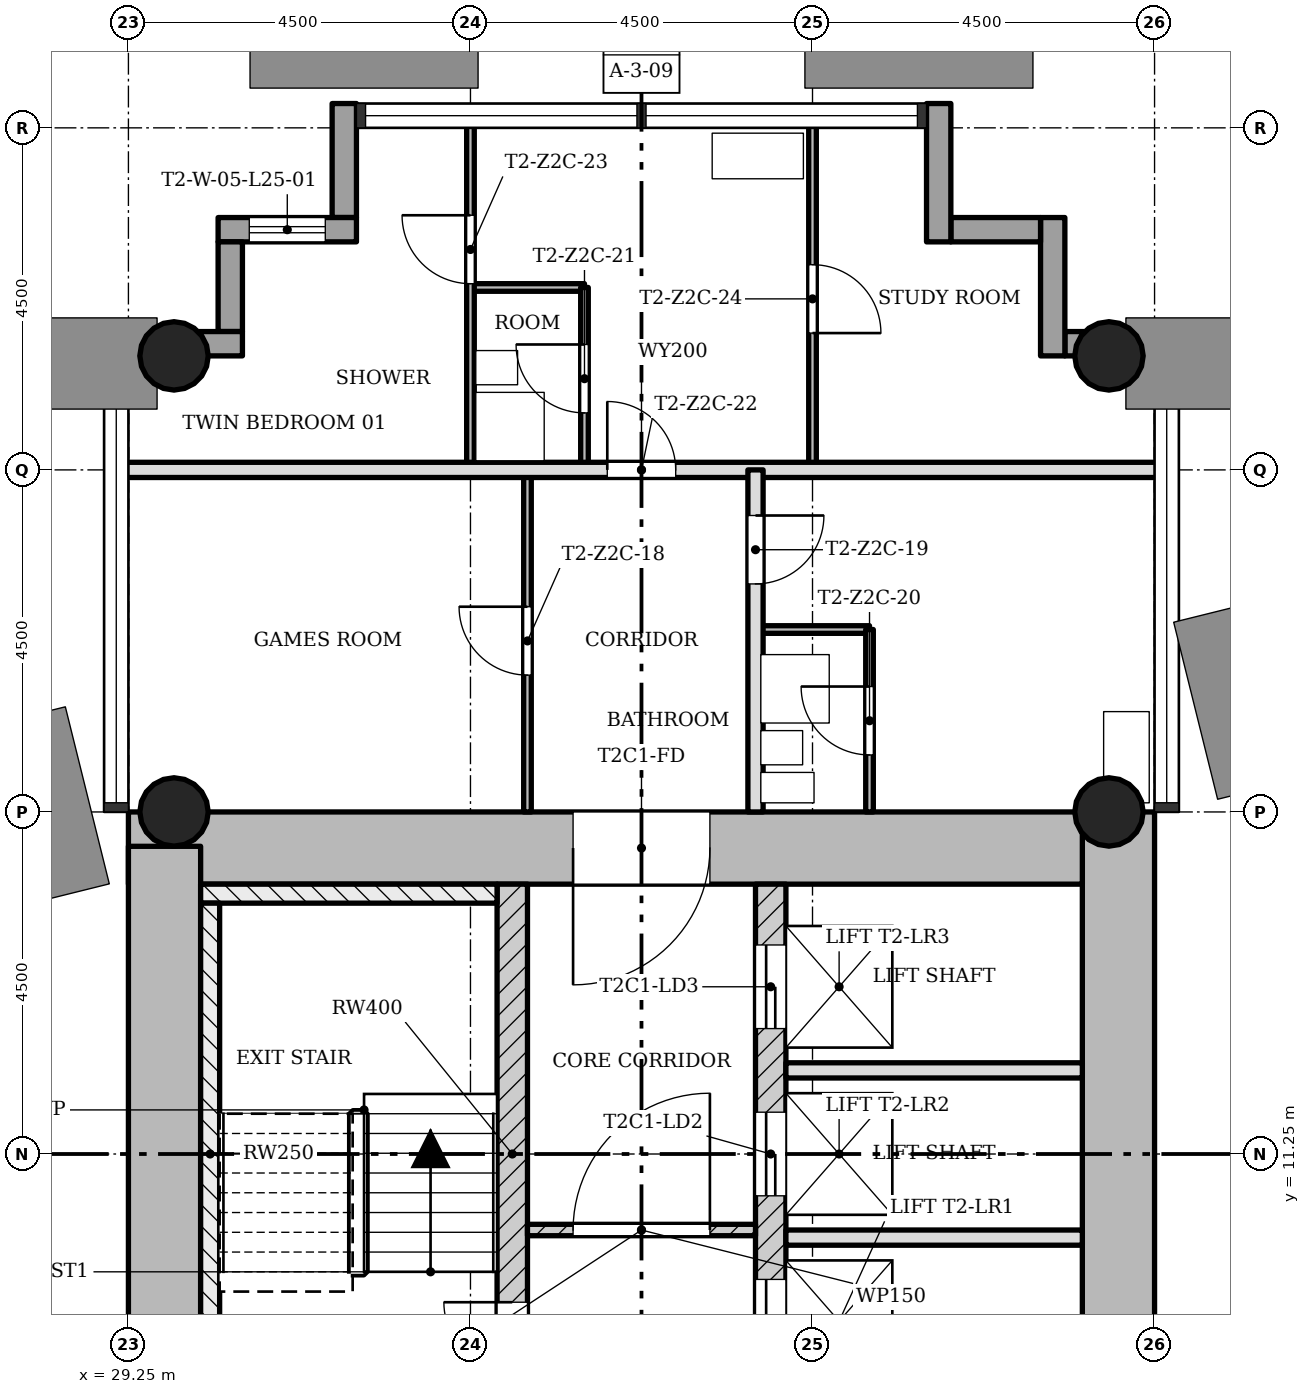
"""IFC4 building model, lengths in metres.
Left out: names, types, materials, properties, quantities, classifications, styles, units other than length and angle.
Written with IfcOpenShell. Run it as: python <this file> out.ifc"""

import sys

from ifc_helpers import new_model, si_unit, direction, frame, frame_2d, origin, origin_2d, place, context, subcontext, project, spatial, rectangle, hollow_circle, extrude, element, fill, save


model = new_model("IFC4")
c1 = context("Model", 3, precision=1e-05, world=origin(), true_north=direction((0.0, 1.0)))
c2 = subcontext(c1, "Body", "Model", "MODEL_VIEW")
j1 = project(units=[si_unit("LENGTHUNIT", "METRE"), si_unit("PLANEANGLEUNIT", "RADIAN")], contexts=[c1])
p1 = place(None, origin())
s1 = spatial("IfcSite", under=j1, at=p1, CompositionType="ELEMENT")
p2 = place(p1, origin())
s2 = spatial("IfcBuilding", under=s1, at=p2, CompositionType="ELEMENT")
p3 = place(p2, frame((0.0, 0.0, 93.6)))
s3 = spatial("IfcBuildingStorey", under=s2, at=p3, CompositionType="ELEMENT", Elevation=93.6)
p4 = place(p3, frame((42.275, 7.7, 0.0), z_axis=(0.0, 0.0, 1.0), x_axis=(0.0, 1.0, 0.0)))
e1 = element("IfcWall", 1, at=p4, inside=s3, PredefinedType="SHEAR", context=c2, shape_type="SweptSolid", body=[
    extrude(rectangle(XDim=8.05, YDim=0.95, at=frame_2d((4.025, 0.0))), origin(), (0.0, 0.0, 1.0), 3.4),
])
p5 = place(p3, frame((41.8, 15.275, 0.0), z_axis=(0.0, 0.0, 1.0), x_axis=(-1.0, 0.0, 0.0)))
e2 = element("IfcWall", 2, at=p5, inside=s3, PredefinedType="SHEAR", context=c2, shape_type="SweptSolid", body=[
    extrude(rectangle(XDim=12.55, YDim=0.95, at=frame_2d((6.275, 0.0))), origin(), (0.0, 0.0, 1.0), 3.4),
])
p6 = place(p5, frame((4.9, 0.0, 0.0)))
e3 = element("IfcOpeningElement", 3, at=p6, cuts=e2, PredefinedType="OPENING", context=c2, shape_type="SweptSolid", body=[
    extrude(rectangle(XDim=1.8, YDim=2.1, at=frame_2d((0.9, 1.05))), frame((0.0, 0.485, 0.0), z_axis=(0.0, -1.0, 0.0), x_axis=(1.0, 0.0, 0.0)), (0.0, 0.0, 1.0), 0.97),
])
p7 = place(p3, frame((29.725, 15.298, 0.0), z_axis=(0.0, 0.0, 1.0), x_axis=(0.0, -1.0, 0.0)))
e4 = element("IfcWall", 4, at=p7, inside=s3, PredefinedType="SHEAR", context=c2, shape_type="SweptSolid", body=[
    extrude(rectangle(XDim=8.696, YDim=0.95, at=frame_2d((4.348, 0.0))), origin(), (0.0, 0.0, 1.0), 3.4),
])
p8 = place(p3, frame((34.3, 7.7, 0.0), z_axis=(0.0, 0.0, 1.0), x_axis=(0.0, 1.0, 0.0)))
e5 = element("IfcWall", 5, at=p8, inside=s3, PredefinedType="SHEAR", context=c2, shape_type="SweptSolid", body=[
    extrude(rectangle(XDim=7.1, YDim=0.4, at=frame_2d((3.55, 0.0))), origin(), (0.0, 0.0, 1.0), 3.4),
])
p9 = place(p8, frame((0.7, 0.0, 0.0)))
e6 = element("IfcOpeningElement", 6, at=p9, cuts=e5, PredefinedType="OPENING", context=c2, shape_type="SweptSolid", body=[
    extrude(rectangle(XDim=0.9, YDim=2.1, at=frame_2d((0.45, 1.05))), frame((0.0, 0.21, 0.0), z_axis=(0.0, -1.0, 0.0), x_axis=(1.0, 0.0, 0.0)), (0.0, 0.0, 1.0), 0.42),
])
p10 = place(p3, frame((37.7, 7.7, 0.0), z_axis=(0.0, 0.0, 1.0), x_axis=(0.0, 1.0, 0.0)))
e7 = element("IfcWall", 7, at=p10, inside=s3, PredefinedType="SHEAR", context=c2, shape_type="SweptSolid", body=[
    extrude(rectangle(XDim=7.1, YDim=0.4, at=frame_2d((3.55, 0.0))), origin(), (0.0, 0.0, 1.0), 3.4),
])
p11 = place(p10, frame((0.8, 0.0, 0.0)))
e8 = element("IfcOpeningElement", 8, at=p11, cuts=e7, PredefinedType="OPENING", context=c2, shape_type="SweptSolid", body=[
    extrude(rectangle(XDim=1.1, YDim=2.1, at=frame_2d((0.55, 1.05))), frame((0.0, 0.21, 0.0), z_axis=(0.0, -1.0, 0.0), x_axis=(1.0, 0.0, 0.0)), (0.0, 0.0, 1.0), 0.42),
])
p12 = place(p10, frame((3.0, 0.0, 0.0)))
e9 = element("IfcOpeningElement", 9, at=p12, cuts=e7, PredefinedType="OPENING", context=c2, shape_type="SweptSolid", body=[
    extrude(rectangle(XDim=1.1, YDim=2.1, at=frame_2d((0.55, 1.05))), frame((0.0, 0.21, 0.0), z_axis=(0.0, -1.0, 0.0), x_axis=(1.0, 0.0, 0.0)), (0.0, 0.0, 1.0), 0.42),
])
p13 = place(p10, frame((5.2, 0.0, 0.0)))
e10 = element("IfcOpeningElement", 10, at=p13, cuts=e7, PredefinedType="OPENING", context=c2, shape_type="SweptSolid", body=[
    extrude(rectangle(XDim=1.1, YDim=2.1, at=frame_2d((0.55, 1.05))), frame((0.0, 0.21, 0.0), z_axis=(0.0, -1.0, 0.0), x_axis=(1.0, 0.0, 0.0)), (0.0, 0.0, 1.0), 0.42),
])
for number, where, z_axis, x_axis in (
    (11, (42.15, 15.75, 0.0), (0.0, 0.0, 1.0), (1.0, 0.0, 0.0)),
    (12, (29.85, 15.75, 0.0), (0.0, 0.0, 1.0), (1.0, 0.0, 0.0)),
    (13, (42.15, 21.75, 0.0), (0.0, 0.0, 1.0), (1.0, 0.0, 0.0)),
    (14, (29.85, 21.75, 0.0), (0.0, 0.0, 1.0), (1.0, 0.0, 0.0)),
):
    element("IfcColumn", number, at=place(p3, frame(where, z_axis=z_axis, x_axis=x_axis)), inside=s3, PredefinedType="COLUMN", context=c2, shape_type="SweptSolid", body=[
        extrude(hollow_circle(Radius=0.45, WallThickness=0.032, at=origin_2d()), origin(), (0.0, 0.0, 1.0), 3.4),
    ])
p14 = place(p3, frame((43.07, 21.91, -0.3), z_axis=(0.0, 0.0, 1.0), x_axis=(-1.0, 0.0, 0.0)))
e15 = element("IfcWall", 15, at=p14, inside=s3, PredefinedType="STANDARD", context=c2, shape_type="SweptSolid", body=[
    extrude(rectangle(XDim=1.5, YDim=0.32, at=frame_2d((0.75, 0.0))), origin(), (0.0, 0.0, 1.0), 3.4),
])
p15 = place(p3, frame((41.41, 21.75, -0.3), z_axis=(0.0, 0.0, 1.0), x_axis=(0.0, 1.0, 0.0)))
e16 = element("IfcWall", 16, at=p15, inside=s3, PredefinedType="STANDARD", context=c2, shape_type="SweptSolid", body=[
    extrude(rectangle(XDim=1.82, YDim=0.32, at=frame_2d((0.91, 0.0))), origin(), (0.0, 0.0, 1.0), 3.4),
])
p16 = place(p3, frame((41.25, 23.41, -0.3), z_axis=(0.0, 0.0, 1.0), x_axis=(-1.0, 0.0, 0.0)))
e17 = element("IfcWall", 17, at=p16, inside=s3, PredefinedType="STANDARD", context=c2, shape_type="SweptSolid", body=[
    extrude(rectangle(XDim=1.18, YDim=0.32, at=frame_2d((0.59, 0.0))), origin(), (0.0, 0.0, 1.0), 3.4),
])
p17 = place(p3, frame((39.91, 23.25, -0.3), z_axis=(0.0, 0.0, 1.0), x_axis=(0.0, 1.0, 0.0)))
e18 = element("IfcWall", 18, at=p17, inside=s3, PredefinedType="STANDARD", context=c2, shape_type="SweptSolid", body=[
    extrude(rectangle(XDim=1.82, YDim=0.32, at=frame_2d((0.91, 0.0))), origin(), (0.0, 0.0, 1.0), 3.4),
])
p18 = place(p3, frame((32.09, 25.07, -0.3), z_axis=(0.0, 0.0, 1.0), x_axis=(0.0, -1.0, 0.0)))
e19 = element("IfcWall", 19, at=p18, inside=s3, PredefinedType="STANDARD", context=c2, shape_type="SweptSolid", body=[
    extrude(rectangle(XDim=1.5, YDim=0.32, at=frame_2d((0.75, 0.0))), origin(), (0.0, 0.0, 1.0), 3.4),
])
p19 = place(p3, frame((32.25, 23.41, -0.3), z_axis=(0.0, 0.0, 1.0), x_axis=(-1.0, 0.0, 0.0)))
e20 = element("IfcWall", 20, at=p19, inside=s3, PredefinedType="STANDARD", context=c2, shape_type="SweptSolid", body=[
    extrude(rectangle(XDim=1.82, YDim=0.32, at=frame_2d((0.91, 0.0))), origin(), (0.0, 0.0, 1.0), 3.4),
])
p20 = place(p19, frame((0.41, 0.0, 1.2)))
e21 = element("IfcOpeningElement", 21, at=p20, cuts=e20, PredefinedType="OPENING", context=c2, shape_type="SweptSolid", body=[
    extrude(rectangle(XDim=1.0, YDim=1.5, at=frame_2d((0.5, 0.75))), frame((0.0, 0.17, 0.0), z_axis=(0.0, -1.0, 0.0), x_axis=(1.0, 0.0, 0.0)), (0.0, 0.0, 1.0), 0.34),
])
p21 = place(p3, frame((30.59, 23.25, -0.3), z_axis=(0.0, 0.0, 1.0), x_axis=(0.0, -1.0, 0.0)))
e22 = element("IfcWall", 22, at=p21, inside=s3, PredefinedType="STANDARD", context=c2, shape_type="SweptSolid", body=[
    extrude(rectangle(XDim=1.18, YDim=0.32, at=frame_2d((0.59, 0.0))), origin(), (0.0, 0.0, 1.0), 3.4),
])
p22 = place(p3, frame((30.75, 21.91, -0.3), z_axis=(0.0, 0.0, 1.0), x_axis=(-1.0, 0.0, 0.0)))
e23 = element("IfcWall", 23, at=p22, inside=s3, PredefinedType="STANDARD", context=c2, shape_type="SweptSolid", body=[
    extrude(rectangle(XDim=1.82, YDim=0.32, at=frame_2d((0.91, 0.0))), origin(), (0.0, 0.0, 1.0), 3.4),
])
p23 = place(p3, frame((37.5, 10.25, 0.0), z_axis=(0.0, 0.0, 1.0), x_axis=(-1.0, 0.0, 0.0)))
e24 = element("IfcWall", 24, at=p23, inside=s3, PredefinedType="PARTITIONING", context=c2, shape_type="SweptSolid", body=[
    extrude(rectangle(XDim=3.0, YDim=0.15, at=frame_2d((1.5, 0.0))), origin(), (0.0, 0.0, 1.0), 3.0),
])
p24 = place(p23, frame((0.6, 0.0, 0.0)))
e25 = element("IfcOpeningElement", 25, at=p24, cuts=e24, PredefinedType="OPENING", context=c2, shape_type="SweptSolid", body=[
    extrude(rectangle(XDim=1.8, YDim=2.1, at=frame_2d((0.9, 1.05))), frame((0.0, 0.085, 0.0), z_axis=(0.0, -1.0, 0.0), x_axis=(1.0, 0.0, 0.0)), (0.0, 0.0, 1.0), 0.17),
])
for number, where, z_axis, x_axis in (
    (26, (41.8, 10.15, 0.0), (0.0, 0.0, 1.0), (-1.0, 0.0, 0.0)),
    (27, (41.8, 12.35, 0.0), (0.0, 0.0, 1.0), (-1.0, 0.0, 0.0)),
):
    element("IfcWall", number, at=place(p3, frame(where, z_axis=z_axis, x_axis=x_axis)), inside=s3, PredefinedType="SOLIDWALL", context=c2, shape_type="SweptSolid", body=[
        extrude(rectangle(XDim=3.9, YDim=0.2, at=frame_2d((1.95, 0.0))), origin(), (0.0, 0.0, 1.0), 3.0),
    ])
p25 = place(p3, frame((39.0, 18.15, 0.0), z_axis=(0.0, 0.0, 1.0), x_axis=(-1.0, 0.0, 0.0)))
e28 = element("IfcWall", 28, at=p25, inside=s3, PredefinedType="PARTITIONING", context=c2, shape_type="SweptSolid", body=[
    extrude(rectangle(XDim=1.5, YDim=0.1, at=frame_2d((0.75, 0.0))), origin(), (0.0, 0.0, 1.0), 3.0),
])
p26 = place(p3, frame((42.85, 20.25, 0.0), z_axis=(0.0, 0.0, 1.0), x_axis=(-1.0, 0.0, 0.0)))
e29 = element("IfcWall", 29, at=p26, inside=s3, PredefinedType="SOLIDWALL", context=c2, shape_type="SweptSolid", body=[
    extrude(rectangle(XDim=13.7, YDim=0.2, at=frame_2d((6.85, 0.0))), origin(), (0.0, 0.0, 1.0), 3.0),
])
p27 = place(p26, frame((6.4, 0.0, 0.0)))
e30 = element("IfcOpeningElement", 30, at=p27, cuts=e29, PredefinedType="OPENING", context=c2, shape_type="SweptSolid", body=[
    extrude(rectangle(XDim=0.9, YDim=2.1, at=frame_2d((0.45, 1.05))), frame((0.0, 0.11, 0.0), z_axis=(0.0, -1.0, 0.0), x_axis=(1.0, 0.0, 0.0)), (0.0, 0.0, 1.0), 0.22),
])
p28 = place(p3, frame((35.25, 22.65, 0.0), z_axis=(0.0, 0.0, 1.0), x_axis=(-1.0, 0.0, 0.0)))
e31 = element("IfcWall", 31, at=p28, inside=s3, PredefinedType="PARTITIONING", context=c2, shape_type="SweptSolid", body=[
    extrude(rectangle(XDim=1.5, YDim=0.1, at=frame_2d((0.75, 0.0))), origin(), (0.0, 0.0, 1.0), 3.0),
])
p29 = place(p3, frame((39.0, 15.75, 0.0), z_axis=(0.0, 0.0, 1.0), x_axis=(0.0, 1.0, 0.0)))
e32 = element("IfcWall", 32, at=p29, inside=s3, PredefinedType="PARTITIONING", context=c2, shape_type="SweptSolid", body=[
    extrude(rectangle(XDim=2.4, YDim=0.1, at=frame_2d((1.2, 0.0))), origin(), (0.0, 0.0, 1.0), 3.0),
])
p30 = place(p29, frame((0.75, 0.0, 0.0)))
e33 = element("IfcOpeningElement", 33, at=p30, cuts=e32, PredefinedType="OPENING", context=c2, shape_type="SweptSolid", body=[
    extrude(rectangle(XDim=0.9, YDim=2.1, at=frame_2d((0.45, 1.05))), frame((0.0, 0.06, 0.0), z_axis=(0.0, -1.0, 0.0), x_axis=(1.0, 0.0, 0.0)), (0.0, 0.0, 1.0), 0.12),
])
p31 = place(p3, frame((38.25, 20.25, 0.0), z_axis=(0.0, 0.0, 1.0), x_axis=(0.0, 1.0, 0.0)))
e34 = element("IfcWall", 34, at=p31, inside=s3, PredefinedType="PARTITIONING", context=c2, shape_type="SweptSolid", body=[
    extrude(rectangle(XDim=4.6, YDim=0.1, at=frame_2d((2.3, 0.0))), origin(), (0.0, 0.0, 1.0), 3.0),
])
p32 = place(p31, frame((1.8, 0.0, 0.0)))
e35 = element("IfcOpeningElement", 35, at=p32, cuts=e34, PredefinedType="OPENING", context=c2, shape_type="SweptSolid", body=[
    extrude(rectangle(XDim=0.9, YDim=2.1, at=frame_2d((0.45, 1.05))), frame((0.0, 0.06, 0.0), z_axis=(0.0, -1.0, 0.0), x_axis=(1.0, 0.0, 0.0)), (0.0, 0.0, 1.0), 0.12),
])
p33 = place(p3, frame((37.5, 15.75, 0.0), z_axis=(0.0, 0.0, 1.0), x_axis=(0.0, 1.0, 0.0)))
e36 = element("IfcWall", 36, at=p33, inside=s3, PredefinedType="SOLIDWALL", context=c2, shape_type="SweptSolid", body=[
    extrude(rectangle(XDim=4.5, YDim=0.2, at=frame_2d((2.25, 0.0))), origin(), (0.0, 0.0, 1.0), 3.0),
])
p34 = place(p33, frame((3.0, 0.0, 0.0)))
e37 = element("IfcOpeningElement", 37, at=p34, cuts=e36, PredefinedType="OPENING", context=c2, shape_type="SweptSolid", body=[
    extrude(rectangle(XDim=0.9, YDim=2.1, at=frame_2d((0.45, 1.05))), frame((0.0, 0.11, 0.0), z_axis=(0.0, -1.0, 0.0), x_axis=(1.0, 0.0, 0.0)), (0.0, 0.0, 1.0), 0.22),
])
p35 = place(p3, frame((35.25, 20.25, 0.0), z_axis=(0.0, 0.0, 1.0), x_axis=(0.0, 1.0, 0.0)))
e38 = element("IfcWall", 38, at=p35, inside=s3, PredefinedType="PARTITIONING", context=c2, shape_type="SweptSolid", body=[
    extrude(rectangle(XDim=2.4, YDim=0.1, at=frame_2d((1.2, 0.0))), origin(), (0.0, 0.0, 1.0), 3.0),
])
p36 = place(p35, frame((0.75, 0.0, 0.0)))
e39 = element("IfcOpeningElement", 39, at=p36, cuts=e38, PredefinedType="OPENING", context=c2, shape_type="SweptSolid", body=[
    extrude(rectangle(XDim=0.9, YDim=2.1, at=frame_2d((0.45, 1.05))), frame((0.0, 0.06, 0.0), z_axis=(0.0, -1.0, 0.0), x_axis=(1.0, 0.0, 0.0)), (0.0, 0.0, 1.0), 0.12),
])
p37 = place(p3, frame((34.5, 15.75, 0.0), z_axis=(0.0, 0.0, 1.0), x_axis=(0.0, 1.0, 0.0)))
e40 = element("IfcWall", 40, at=p37, inside=s3, PredefinedType="PARTITIONING", context=c2, shape_type="SweptSolid", body=[
    extrude(rectangle(XDim=4.5, YDim=0.1, at=frame_2d((2.25, 0.0))), origin(), (0.0, 0.0, 1.0), 3.0),
])
p38 = place(p37, frame((1.8, 0.0, 0.0)))
e41 = element("IfcOpeningElement", 41, at=p38, cuts=e40, PredefinedType="OPENING", context=c2, shape_type="SweptSolid", body=[
    extrude(rectangle(XDim=0.9, YDim=2.1, at=frame_2d((0.45, 1.05))), frame((0.0, 0.06, 0.0), z_axis=(0.0, -1.0, 0.0), x_axis=(1.0, 0.0, 0.0)), (0.0, 0.0, 1.0), 0.12),
])
p39 = place(p3, frame((33.75, 20.25, 0.0), z_axis=(0.0, 0.0, 1.0), x_axis=(0.0, 1.0, 0.0)))
e42 = element("IfcWall", 42, at=p39, inside=s3, PredefinedType="PARTITIONING", context=c2, shape_type="SweptSolid", body=[
    extrude(rectangle(XDim=4.6, YDim=0.1, at=frame_2d((2.3, 0.0))), origin(), (0.0, 0.0, 1.0), 3.0),
])
p40 = place(p39, frame((2.45, 0.0, 0.0)))
e43 = element("IfcOpeningElement", 43, at=p40, cuts=e42, PredefinedType="OPENING", context=c2, shape_type="SweptSolid", body=[
    extrude(rectangle(XDim=0.9, YDim=2.1, at=frame_2d((0.45, 1.05))), frame((0.0, 0.06, 0.0), z_axis=(0.0, -1.0, 0.0), x_axis=(1.0, 0.0, 0.0)), (0.0, 0.0, 1.0), 0.12),
])
p41 = place(p3, frame((34.1, 14.675, 0.0), z_axis=(0.0, 0.0, 1.0), x_axis=(-1.0, 0.0, 0.0)))
e44 = element("IfcWall", 44, at=p41, inside=s3, PredefinedType="SHEAR", context=c2, shape_type="SweptSolid", body=[
    extrude(rectangle(XDim=3.9, YDim=0.25, at=frame_2d((1.95, 0.0))), origin(), (0.0, 0.0, 1.0), 3.4),
])
p42 = place(p3, frame((30.325, 7.95, 0.0), z_axis=(0.0, 0.0, 1.0), x_axis=(0.0, 1.0, 0.0)))
e45 = element("IfcWall", 45, at=p42, inside=s3, PredefinedType="SHEAR", context=c2, shape_type="SweptSolid", body=[
    extrude(rectangle(XDim=6.6, YDim=0.25, at=frame_2d((3.3, 0.0))), origin(), (0.0, 0.0, 1.0), 3.4),
])
p43 = place(p24, origin())
e46 = element("IfcDoor", 46, at=p43, inside=s3, OperationType="SINGLE_SWING_LEFT", PredefinedType="DOOR", context=c2, shape_type="SweptSolid", body=[
    extrude(rectangle(XDim=1.8, YDim=2.1, at=frame_2d((0.9, 1.05))), frame((0.0, 0.025, 0.0), z_axis=(0.0, -1.0, 0.0), x_axis=(1.0, 0.0, 0.0)), (0.0, 0.0, 1.0), 0.05),
])
fill(e25, e46)
p44 = place(p38, origin())
e47 = element("IfcDoor", 47, at=p44, inside=s3, OperationType="SINGLE_SWING_LEFT", PredefinedType="DOOR", context=c2, shape_type="SweptSolid", body=[
    extrude(rectangle(XDim=0.9, YDim=2.1, at=frame_2d((0.45, 1.05))), frame((0.0, 0.025, 0.0), z_axis=(0.0, -1.0, 0.0), x_axis=(1.0, 0.0, 0.0)), (0.0, 0.0, 1.0), 0.05),
])
fill(e41, e47)
p45 = place(p34, origin())
e48 = element("IfcDoor", 48, at=p45, inside=s3, OperationType="SINGLE_SWING_RIGHT", PredefinedType="DOOR", context=c2, shape_type="SweptSolid", body=[
    extrude(rectangle(XDim=0.9, YDim=2.1, at=frame_2d((0.45, 1.05))), frame((0.0, 0.025, 0.0), z_axis=(0.0, -1.0, 0.0), x_axis=(1.0, 0.0, 0.0)), (0.0, 0.0, 1.0), 0.05),
])
fill(e37, e48)
p46 = place(p30, origin())
e49 = element("IfcDoor", 49, at=p46, inside=s3, OperationType="SINGLE_SWING_LEFT", PredefinedType="DOOR", context=c2, shape_type="SweptSolid", body=[
    extrude(rectangle(XDim=0.9, YDim=2.1, at=frame_2d((0.45, 1.05))), frame((0.0, 0.025, 0.0), z_axis=(0.0, -1.0, 0.0), x_axis=(1.0, 0.0, 0.0)), (0.0, 0.0, 1.0), 0.05),
])
fill(e33, e49)
p47 = place(p36, origin())
e50 = element("IfcDoor", 50, at=p47, inside=s3, OperationType="SINGLE_SWING_LEFT", PredefinedType="DOOR", context=c2, shape_type="SweptSolid", body=[
    extrude(rectangle(XDim=0.9, YDim=2.1, at=frame_2d((0.45, 1.05))), frame((0.0, 0.025, 0.0), z_axis=(0.0, -1.0, 0.0), x_axis=(1.0, 0.0, 0.0)), (0.0, 0.0, 1.0), 0.05),
])
fill(e39, e50)
p48 = place(p27, origin())
e51 = element("IfcDoor", 51, at=p48, inside=s3, OperationType="SINGLE_SWING_RIGHT", PredefinedType="DOOR", context=c2, shape_type="SweptSolid", body=[
    extrude(rectangle(XDim=0.9, YDim=2.1, at=frame_2d((0.45, 1.05))), frame((0.0, 0.025, 0.0), z_axis=(0.0, -1.0, 0.0), x_axis=(1.0, 0.0, 0.0)), (0.0, 0.0, 1.0), 0.05),
])
fill(e30, e51)
p49 = place(p40, origin())
e52 = element("IfcDoor", 52, at=p49, inside=s3, OperationType="SINGLE_SWING_LEFT", PredefinedType="DOOR", context=c2, shape_type="SweptSolid", body=[
    extrude(rectangle(XDim=0.9, YDim=2.1, at=frame_2d((0.45, 1.05))), frame((0.0, 0.025, 0.0), z_axis=(0.0, -1.0, 0.0), x_axis=(1.0, 0.0, 0.0)), (0.0, 0.0, 1.0), 0.05),
])
fill(e43, e52)
p50 = place(p32, origin())
e53 = element("IfcDoor", 53, at=p50, inside=s3, OperationType="SINGLE_SWING_LEFT", PredefinedType="DOOR", context=c2, shape_type="SweptSolid", body=[
    extrude(rectangle(XDim=0.9, YDim=2.1, at=frame_2d((0.45, 1.05))), frame((0.0, 0.025, 0.0), z_axis=(0.0, -1.0, 0.0), x_axis=(1.0, 0.0, 0.0)), (0.0, 0.0, 1.0), 0.05),
])
fill(e35, e53)
p51 = place(p9, origin())
e54 = element("IfcDoor", 54, at=p51, inside=s3, OperationType="SINGLE_SWING_LEFT", PredefinedType="DOOR", context=c2, shape_type="SweptSolid", body=[
    extrude(rectangle(XDim=0.9, YDim=2.1, at=frame_2d((0.45, 1.05))), frame((0.0, 0.025, 0.0), z_axis=(0.0, -1.0, 0.0), x_axis=(1.0, 0.0, 0.0)), (0.0, 0.0, 1.0), 0.05),
])
fill(e6, e54)
p52 = place(p11, origin())
e55 = element("IfcDoor", 55, at=p52, inside=s3, OperationType="SLIDING_TO_LEFT", PredefinedType="DOOR", context=c2, shape_type="SweptSolid", body=[
    extrude(rectangle(XDim=1.1, YDim=2.1, at=frame_2d((0.55, 1.05))), frame((0.0, 0.025, 0.0), z_axis=(0.0, -1.0, 0.0), x_axis=(1.0, 0.0, 0.0)), (0.0, 0.0, 1.0), 0.05),
])
fill(e8, e55)
p53 = place(p12, origin())
e56 = element("IfcDoor", 56, at=p53, inside=s3, OperationType="SLIDING_TO_LEFT", PredefinedType="DOOR", context=c2, shape_type="SweptSolid", body=[
    extrude(rectangle(XDim=1.1, YDim=2.1, at=frame_2d((0.55, 1.05))), frame((0.0, 0.025, 0.0), z_axis=(0.0, -1.0, 0.0), x_axis=(1.0, 0.0, 0.0)), (0.0, 0.0, 1.0), 0.05),
])
fill(e9, e56)
p54 = place(p13, origin())
e57 = element("IfcDoor", 57, at=p54, inside=s3, OperationType="SLIDING_TO_LEFT", PredefinedType="DOOR", context=c2, shape_type="SweptSolid", body=[
    extrude(rectangle(XDim=1.1, YDim=2.1, at=frame_2d((0.55, 1.05))), frame((0.0, 0.025, 0.0), z_axis=(0.0, -1.0, 0.0), x_axis=(1.0, 0.0, 0.0)), (0.0, 0.0, 1.0), 0.05),
])
fill(e10, e57)
p55 = place(p6, origin())
e58 = element("IfcDoor", 58, at=p55, inside=s3, OperationType="SINGLE_SWING_LEFT", PredefinedType="DOOR", context=c2, shape_type="SweptSolid", body=[
    extrude(rectangle(XDim=1.8, YDim=2.1, at=frame_2d((0.9, 1.05))), frame((0.0, 0.025, 0.0), z_axis=(0.0, -1.0, 0.0), x_axis=(1.0, 0.0, 0.0)), (0.0, 0.0, 1.0), 0.05),
])
fill(e3, e58)
p56 = place(p20, origin())
e59 = element("IfcWindow", 59, at=p56, inside=s3, PartitioningType="SINGLE_PANEL", PredefinedType="WINDOW", context=c2, shape_type="SweptSolid", body=[
    extrude(rectangle(XDim=1.0, YDim=1.5, at=frame_2d((0.5, 0.75))), frame((0.0, 0.03, 0.0), z_axis=(0.0, -1.0, 0.0), x_axis=(1.0, 0.0, 0.0)), (0.0, 0.0, 1.0), 0.06),
])
fill(e21, e59)
save(model, sys.argv[1])
